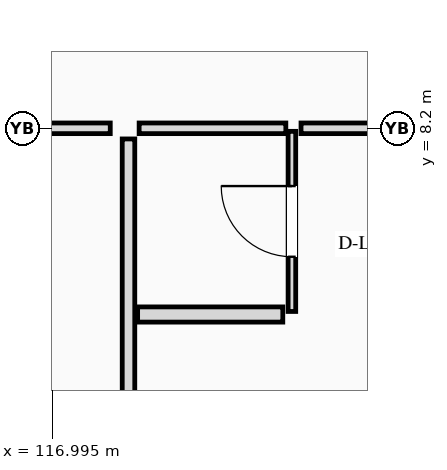
"""IFC4 building model, lengths in metres.
Left out: names, types, materials, properties, quantities, classifications, styles, units other than length and angle.
Written with IfcOpenShell. Run it as: python <this file> out.ifc"""

import sys

from ifc_helpers import new_model, si_unit, direction, frame, frame_2d, origin, place, context, subcontext, project, spatial, rectangle, extrude, element, fill, save


model = new_model("IFC4")
c1 = context("Model", 3, precision=1e-05, world=origin(), true_north=direction((0.0, 1.0)))
c2 = subcontext(c1, "Body", "Model", "MODEL_VIEW")
j1 = project(units=[si_unit("LENGTHUNIT", "METRE"), si_unit("PLANEANGLEUNIT", "RADIAN")], contexts=[c1])
p1 = place(None, origin())
s1 = spatial("IfcSite", under=j1, at=p1, CompositionType="ELEMENT")
p2 = place(p1, origin())
s2 = spatial("IfcBuilding", under=s1, at=p2, CompositionType="ELEMENT")
p3 = place(p2, frame((0.0, 0.0, 34.1)))
s3 = spatial("IfcBuildingStorey", under=s2, at=p3, CompositionType="ELEMENT", Elevation=34.1)
p4 = place(p3, frame((114.57, 8.2, 0.0), z_axis=(0.0, 0.0, 1.0), x_axis=(1.0, 0.0, 0.0)))
e1 = element("IfcWall", 1, at=p4, inside=s3, PredefinedType="PARTITIONING", context=c2, shape_type="SweptSolid", body=[
    extrude(rectangle(XDim=3.19, YDim=0.14, at=frame_2d((1.595, 0.0))), origin(), (0.0, 0.0, 1.0), 2.428),
])
p5 = place(p4, frame((1.12, 0.0, 0.0)))
e2 = element("IfcOpeningElement", 2, at=p5, cuts=e1, PredefinedType="OPENING", context=c2, shape_type="SweptSolid", body=[
    extrude(rectangle(XDim=0.95, YDim=2.15, at=frame_2d((0.475, 1.075))), frame((0.0, 0.08, 0.0), z_axis=(0.0, -1.0, 0.0), x_axis=(1.0, 0.0, 0.0)), (0.0, 0.0, 1.0), 0.16),
])
p6 = place(p3, frame((118.0, -0.31, 0.0), z_axis=(0.0, 0.0, 1.0), x_axis=(0.0, 1.0, 0.0)))
e3 = element("IfcWall", 3, at=p6, inside=s3, PredefinedType="PARTITIONING", context=c2, shape_type="SweptSolid", body=[
    extrude(rectangle(XDim=8.37, YDim=0.165, at=frame_2d((4.185, 0.0))), origin(), (0.0, 0.0, 1.0), 2.428),
])
p7 = place(p3, frame((118.14, 8.2, 0.0), z_axis=(0.0, 0.0, 1.0), x_axis=(1.0, 0.0, 0.0)))
e4 = element("IfcWall", 4, at=p7, inside=s3, PredefinedType="PARTITIONING", context=c2, shape_type="SweptSolid", body=[
    extrude(rectangle(XDim=1.93, YDim=0.14, at=frame_2d((0.965, 0.0))), origin(), (0.0, 0.0, 1.0), 2.428),
])
p8 = place(p3, frame((120.27, 8.2, 0.0), z_axis=(0.0, 0.0, 1.0), x_axis=(1.0, 0.0, 0.0)))
e5 = element("IfcWall", 5, at=p8, inside=s3, PredefinedType="PARTITIONING", context=c2, shape_type="SweptSolid", body=[
    extrude(rectangle(XDim=3.19, YDim=0.14, at=frame_2d((1.595, 0.0))), origin(), (0.0, 0.0, 1.0), 2.428),
])
p9 = place(p8, frame((1.105, 0.0, 0.0)))
e6 = element("IfcOpeningElement", 6, at=p9, cuts=e5, PredefinedType="OPENING", context=c2, shape_type="SweptSolid", body=[
    extrude(rectangle(XDim=0.98, YDim=2.2, at=frame_2d((0.49, 1.1))), frame((0.0, 0.08, 0.0), z_axis=(0.0, -1.0, 0.0), x_axis=(1.0, 0.0, 0.0)), (0.0, 0.0, 1.0), 0.16),
])
p10 = place(p3, frame((120.15, 5.79, 0.0), z_axis=(0.0, 0.0, 1.0), x_axis=(0.0, 1.0, 0.0)))
e7 = element("IfcWall", 7, at=p10, inside=s3, PredefinedType="PARTITIONING", context=c2, shape_type="SweptSolid", body=[
    extrude(rectangle(XDim=2.37, YDim=0.1, at=frame_2d((1.185, 0.0))), origin(), (0.0, 0.0, 1.0), 2.428),
])
p11 = place(p10, frame((0.72, 0.0, 0.0)))
e8 = element("IfcOpeningElement", 8, at=p11, cuts=e7, PredefinedType="OPENING", context=c2, shape_type="SweptSolid", body=[
    extrude(rectangle(XDim=0.93, YDim=2.14, at=frame_2d((0.465, 1.07))), frame((0.0, 0.06, 0.0), z_axis=(0.0, -1.0, 0.0), x_axis=(1.0, 0.0, 0.0)), (0.0, 0.0, 1.0), 0.12),
])
p12 = place(p3, frame((118.12, 5.75, 0.0), z_axis=(0.0, 0.0, 1.0), x_axis=(1.0, 0.0, 0.0)))
e9 = element("IfcWall", 9, at=p12, inside=s3, PredefinedType="PLUMBINGWALL", context=c2, shape_type="SweptSolid", body=[
    extrude(rectangle(XDim=1.91, YDim=0.2, at=frame_2d((0.955, 0.0))), origin(), (0.0, 0.0, 1.0), 2.743),
])
p13 = place(p11, origin())
e10 = element("IfcDoor", 10, at=p13, inside=s3, OperationType="SINGLE_SWING_RIGHT", PredefinedType="DOOR", context=c2, shape_type="SweptSolid", body=[
    extrude(rectangle(XDim=0.93, YDim=2.14, at=frame_2d((0.465, 1.07))), frame((0.0, 0.025, 0.0), z_axis=(0.0, -1.0, 0.0), x_axis=(1.0, 0.0, 0.0)), (0.0, 0.0, 1.0), 0.05),
])
fill(e8, e10)
save(model, sys.argv[1])
